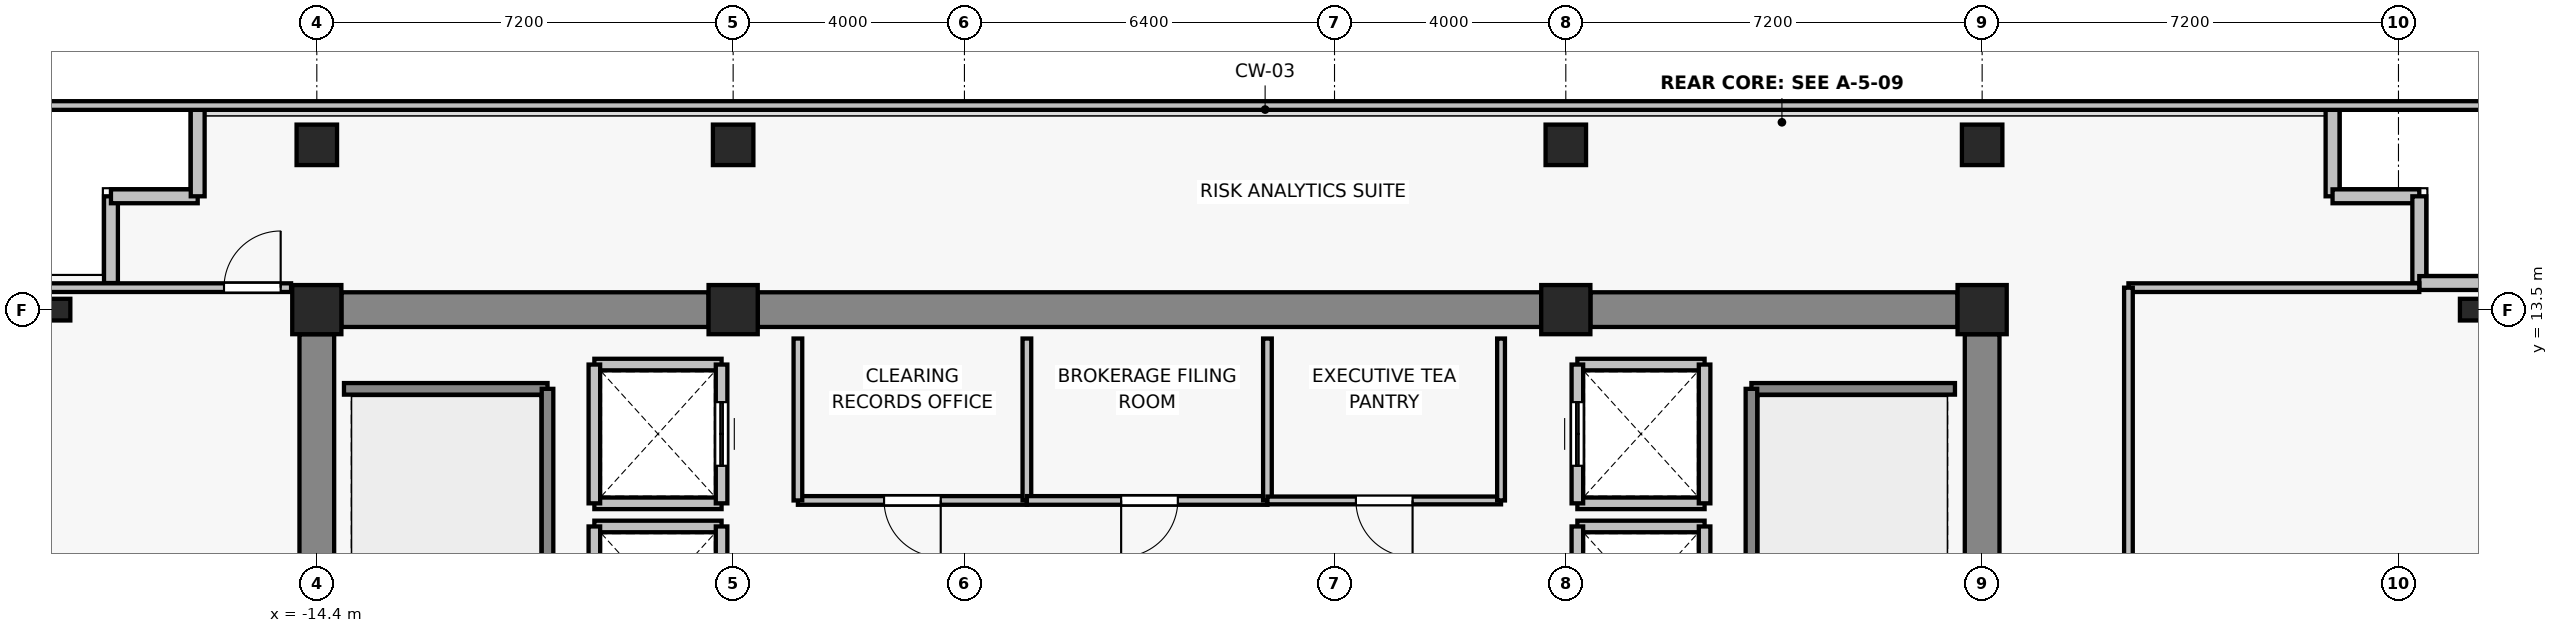
"""IFC4 building model, lengths in metres.
Left out: names, types, materials, properties, quantities, classifications, styles, units other than length and angle.
Written with IfcOpenShell. Run it as: python <this file> out.ifc"""

import sys

from ifc_helpers import new_model, si_unit, direction, frame, frame_2d, origin, origin_2d, place, context, subcontext, project, spatial, rectangle, i_section, extrude, source, transform, mapped, element, fill, save


model = new_model("IFC4")
c1 = context("Model", 3, precision=1e-05, world=origin(), true_north=direction((0.0, 1.0)))
c2 = subcontext(c1, "Body", "Model", "MODEL_VIEW")
j1 = project(units=[si_unit("LENGTHUNIT", "METRE"), si_unit("PLANEANGLEUNIT", "RADIAN")], contexts=[c1])
p1 = place(None, origin())
s1 = spatial("IfcSite", under=j1, at=p1, CompositionType="ELEMENT")
p2 = place(p1, origin())
s2 = spatial("IfcBuilding", under=s1, at=p2, CompositionType="ELEMENT")
p3 = place(p2, frame((0.0, 0.0, 241.9)))
s3 = spatial("IfcBuildingStorey", under=s2, at=p3, CompositionType="ELEMENT", Elevation=241.9)
for number, where, z_axis, x_axis in (
    (1, (-14.4, 13.5, 0.0), (0.0, 0.0, 1.0), (1.0, 0.0, 0.0)),
    (2, (-7.2, 13.5, 0.0), (0.0, 0.0, 1.0), (1.0, 0.0, 0.0)),
    (3, (7.2, 13.5, 0.0), (0.0, 0.0, 1.0), (1.0, 0.0, 0.0)),
    (4, (14.4, 13.5, 0.0), (0.0, 0.0, 1.0), (1.0, 0.0, 0.0)),
):
    element("IfcColumn", number, at=place(p3, frame(where, z_axis=z_axis, x_axis=x_axis)), inside=s3, PredefinedType="COLUMN", context=c2, shape_type="SweptSolid", body=[
        extrude(rectangle(XDim=0.85, YDim=0.85, at=origin_2d()), origin(), (0.0, 0.0, 1.0), 3.3),
    ])
for number, where, z_axis, x_axis in (
    (5, (-14.4, 16.35, 0.0), (0.0, 0.0, 1.0), (1.0, 0.0, 0.0)),
    (6, (-7.2, 16.35, 0.0), (0.0, 0.0, 1.0), (1.0, 0.0, 0.0)),
    (7, (7.2, 16.35, 0.0), (0.0, 0.0, 1.0), (1.0, 0.0, 0.0)),
    (8, (14.4, 16.35, 0.0), (0.0, 0.0, 1.0), (1.0, 0.0, 0.0)),
):
    element("IfcColumn", number, at=place(p3, frame(where, z_axis=z_axis, x_axis=x_axis)), inside=s3, PredefinedType="COLUMN", context=c2, shape_type="SweptSolid", body=[
        extrude(rectangle(XDim=0.7, YDim=0.7, at=origin_2d()), origin(), (0.0, 0.0, 1.0), 3.3),
    ])
for number, where, z_axis, x_axis in (
    (9, (-18.85, 13.5, 0.0), (0.0, 0.0, 1.0), (1.0, 0.0, 0.0)),
    (10, (22.85, 13.5, 0.0), (0.0, 0.0, 1.0), (1.0, 0.0, 0.0)),
):
    element("IfcColumn", number, at=place(p3, frame(where, z_axis=z_axis, x_axis=x_axis)), inside=s3, PredefinedType="COLUMN", context=c2, shape_type="SweptSolid", body=[
        extrude(i_section(OverallWidth=0.375, OverallDepth=0.375, WebThickness=0.017, FlangeThickness=0.027, FilletRadius=0.015, at=origin_2d()), origin(), (0.0, 0.0, 1.0), 3.3),
    ])
p4 = place(p3, frame((-13.975, 13.5, 0.0), z_axis=(0.0, 0.0, 1.0), x_axis=(1.0, 0.0, 0.0)))
e11 = element("IfcWall", 11, at=p4, inside=s3, PredefinedType="SHEAR", context=c2, shape_type="SweptSolid", body=[
    extrude(rectangle(XDim=6.35, YDim=0.6, at=frame_2d((3.175, 0.0))), origin(), (0.0, 0.0, 1.0), 3.075),
])
p5 = place(p3, frame((-6.775, 13.5, 0.0), z_axis=(0.0, 0.0, 1.0), x_axis=(1.0, 0.0, 0.0)))
e12 = element("IfcWall", 12, at=p5, inside=s3, PredefinedType="SHEAR", context=c2, shape_type="SweptSolid", body=[
    extrude(rectangle(XDim=13.55, YDim=0.6, at=frame_2d((6.775, 0.0))), origin(), (0.0, 0.0, 1.0), 3.075),
])
p6 = place(p3, frame((7.625, 13.5, 0.0), z_axis=(0.0, 0.0, 1.0), x_axis=(1.0, 0.0, 0.0)))
e13 = element("IfcWall", 13, at=p6, inside=s3, PredefinedType="SHEAR", context=c2, shape_type="SweptSolid", body=[
    extrude(rectangle(XDim=6.35, YDim=0.6, at=frame_2d((3.175, 0.0))), origin(), (0.0, 0.0, 1.0), 3.075),
])
for number, where, z_axis, x_axis in (
    (14, (-14.4, 7.025, 0.0), (0.0, 0.0, 1.0), (0.0, 1.0, 0.0)),
    (15, (14.4, 7.025, 0.0), (0.0, 0.0, 1.0), (0.0, 1.0, 0.0)),
):
    element("IfcWall", number, at=place(p3, frame(where, z_axis=z_axis, x_axis=x_axis)), inside=s3, PredefinedType="SHEAR", context=c2, shape_type="SweptSolid", body=[
        extrude(rectangle(XDim=6.05, YDim=0.6, at=frame_2d((3.025, 0.0))), origin(), (0.0, 0.0, 1.0), 3.075),
    ])
for number, where, z_axis, x_axis in (
    (16, (-17.96, 15.46, 0.0), (0.0, 0.0, 1.0), (0.0, -1.0, 0.0)),
    (17, (-16.46, 15.46, 0.0), (0.0, 0.0, 1.0), (-1.0, 0.0, 0.0)),
    (18, (-16.46, 16.96, 0.0), (0.0, 0.0, 1.0), (0.0, -1.0, 0.0)),
    (19, (20.46, 15.46, 0.0), (0.0, 0.0, 1.0), (0.0, 1.0, 0.0)),
    (20, (21.96, 15.46, 0.0), (0.0, 0.0, 1.0), (-1.0, 0.0, 0.0)),
    (21, (21.96, 13.96, 0.0), (0.0, 0.0, 1.0), (0.0, 1.0, 0.0)),
    (22, (23.46, 13.96, 0.0), (0.0, 0.0, 1.0), (-1.0, 0.0, 0.0)),
):
    element("IfcWall", number, at=place(p3, frame(where, z_axis=z_axis, x_axis=x_axis)), inside=s3, PredefinedType="SOLIDWALL", context=c2, shape_type="SweptSolid", body=[
        extrude(rectangle(XDim=1.5, YDim=0.24, at=frame_2d((0.75, 0.0))), origin(), (0.0, 0.0, 1.0), 3.075),
    ])
p7 = place(p3, frame((-9.6, 9.75, 0.0), z_axis=(0.0, 0.0, 1.0), x_axis=(1.0, 0.0, 0.0)))
e23 = element("IfcWall", 23, at=p7, inside=s3, PredefinedType="SOLIDWALL", context=c2, shape_type="SweptSolid", body=[
    extrude(rectangle(XDim=2.2, YDim=0.2, at=frame_2d((1.1, 0.0))), origin(), (0.0, 0.0, 1.0), 2.615),
])
p8 = place(p3, frame((-9.6, 7.35, 0.0), z_axis=(0.0, 0.0, 1.0), x_axis=(0.0, 1.0, 0.0)))
e24 = element("IfcWall", 24, at=p8, inside=s3, PredefinedType="SOLIDWALL", context=c2, shape_type="SweptSolid", body=[
    extrude(rectangle(XDim=2.4, YDim=0.2, at=frame_2d((1.2, 0.0))), origin(), (0.0, 0.0, 1.0), 3.075),
])
p9 = place(p3, frame((-7.4, 9.75, 0.0), z_axis=(0.0, 0.0, 1.0), x_axis=(0.0, -1.0, 0.0)))
e25 = element("IfcWall", 25, at=p9, inside=s3, PredefinedType="SOLIDWALL", context=c2, shape_type="SweptSolid", body=[
    extrude(rectangle(XDim=2.4, YDim=0.2, at=frame_2d((1.2, 0.0))), origin(), (0.0, 0.0, 1.0), 2.615),
])
p10 = place(p9, frame((0.65, 0.0, 0.0)))
e26 = element("IfcOpeningElement", 26, at=p10, cuts=e25, PredefinedType="OPENING", context=c2, shape_type="SweptSolid", body=[
    extrude(rectangle(XDim=1.1, YDim=2.2, at=frame_2d((0.55, 1.1))), frame((0.0, 0.11, 0.0), z_axis=(0.0, -1.0, 0.0), x_axis=(1.0, 0.0, 0.0)), (0.0, 0.0, 1.0), 0.22),
])
for number, where, z_axis, x_axis in (
    (27, (-7.4, 10.15, 0.0), (0.0, 0.0, 1.0), (-1.0, 0.0, 0.0)),
    (28, (-9.6, 12.55, 0.0), (0.0, 0.0, 1.0), (1.0, 0.0, 0.0)),
):
    element("IfcWall", number, at=place(p3, frame(where, z_axis=z_axis, x_axis=x_axis)), inside=s3, PredefinedType="SOLIDWALL", context=c2, shape_type="SweptSolid", body=[
        extrude(rectangle(XDim=2.2, YDim=0.2, at=frame_2d((1.1, 0.0))), origin(), (0.0, 0.0, 1.0), 2.615),
    ])
p11 = place(p3, frame((-9.6, 10.15, 0.0), z_axis=(0.0, 0.0, 1.0), x_axis=(0.0, 1.0, 0.0)))
e29 = element("IfcWall", 29, at=p11, inside=s3, PredefinedType="SOLIDWALL", context=c2, shape_type="SweptSolid", body=[
    extrude(rectangle(XDim=2.4, YDim=0.2, at=frame_2d((1.2, 0.0))), origin(), (0.0, 0.0, 1.0), 3.075),
])
p12 = place(p3, frame((-7.4, 12.55, 0.0), z_axis=(0.0, 0.0, 1.0), x_axis=(0.0, -1.0, 0.0)))
e30 = element("IfcWall", 30, at=p12, inside=s3, PredefinedType="SOLIDWALL", context=c2, shape_type="SweptSolid", body=[
    extrude(rectangle(XDim=2.4, YDim=0.2, at=frame_2d((1.2, 0.0))), origin(), (0.0, 0.0, 1.0), 2.615),
])
p13 = place(p12, frame((0.65, 0.0, 0.0)))
e31 = element("IfcOpeningElement", 31, at=p13, cuts=e30, PredefinedType="OPENING", context=c2, shape_type="SweptSolid", body=[
    extrude(rectangle(XDim=1.1, YDim=2.2, at=frame_2d((0.55, 1.1))), frame((0.0, 0.11, 0.0), z_axis=(0.0, -1.0, 0.0), x_axis=(1.0, 0.0, 0.0)), (0.0, 0.0, 1.0), 0.22),
])
p14 = place(p3, frame((7.4, 9.75, 0.0), z_axis=(0.0, 0.0, 1.0), x_axis=(1.0, 0.0, 0.0)))
e32 = element("IfcWall", 32, at=p14, inside=s3, PredefinedType="SOLIDWALL", context=c2, shape_type="SweptSolid", body=[
    extrude(rectangle(XDim=2.2, YDim=0.2, at=frame_2d((1.1, 0.0))), origin(), (0.0, 0.0, 1.0), 2.615),
])
p15 = place(p3, frame((7.4, 7.35, 0.0), z_axis=(0.0, 0.0, 1.0), x_axis=(0.0, 1.0, 0.0)))
e33 = element("IfcWall", 33, at=p15, inside=s3, PredefinedType="SOLIDWALL", context=c2, shape_type="SweptSolid", body=[
    extrude(rectangle(XDim=2.4, YDim=0.2, at=frame_2d((1.2, 0.0))), origin(), (0.0, 0.0, 1.0), 2.615),
])
p16 = place(p15, frame((0.65, 0.0, 0.0)))
e34 = element("IfcOpeningElement", 34, at=p16, cuts=e33, PredefinedType="OPENING", context=c2, shape_type="SweptSolid", body=[
    extrude(rectangle(XDim=1.1, YDim=2.2, at=frame_2d((0.55, 1.1))), frame((0.0, 0.11, 0.0), z_axis=(0.0, -1.0, 0.0), x_axis=(1.0, 0.0, 0.0)), (0.0, 0.0, 1.0), 0.22),
])
p17 = place(p3, frame((9.6, 9.75, 0.0), z_axis=(0.0, 0.0, 1.0), x_axis=(0.0, -1.0, 0.0)))
e35 = element("IfcWall", 35, at=p17, inside=s3, PredefinedType="SOLIDWALL", context=c2, shape_type="SweptSolid", body=[
    extrude(rectangle(XDim=2.4, YDim=0.2, at=frame_2d((1.2, 0.0))), origin(), (0.0, 0.0, 1.0), 3.075),
])
for number, where, z_axis, x_axis in (
    (36, (9.6, 10.15, 0.0), (0.0, 0.0, 1.0), (-1.0, 0.0, 0.0)),
    (37, (7.4, 12.55, 0.0), (0.0, 0.0, 1.0), (1.0, 0.0, 0.0)),
):
    element("IfcWall", number, at=place(p3, frame(where, z_axis=z_axis, x_axis=x_axis)), inside=s3, PredefinedType="SOLIDWALL", context=c2, shape_type="SweptSolid", body=[
        extrude(rectangle(XDim=2.2, YDim=0.2, at=frame_2d((1.1, 0.0))), origin(), (0.0, 0.0, 1.0), 2.615),
    ])
p18 = place(p3, frame((7.4, 10.15, 0.0), z_axis=(0.0, 0.0, 1.0), x_axis=(0.0, 1.0, 0.0)))
e38 = element("IfcWall", 38, at=p18, inside=s3, PredefinedType="SOLIDWALL", context=c2, shape_type="SweptSolid", body=[
    extrude(rectangle(XDim=2.4, YDim=0.2, at=frame_2d((1.2, 0.0))), origin(), (0.0, 0.0, 1.0), 2.615),
])
p19 = place(p18, frame((0.65, 0.0, 0.0)))
e39 = element("IfcOpeningElement", 39, at=p19, cuts=e38, PredefinedType="OPENING", context=c2, shape_type="SweptSolid", body=[
    extrude(rectangle(XDim=1.1, YDim=2.2, at=frame_2d((0.55, 1.1))), frame((0.0, 0.11, 0.0), z_axis=(0.0, -1.0, 0.0), x_axis=(1.0, 0.0, 0.0)), (0.0, 0.0, 1.0), 0.22),
])
p20 = place(p3, frame((9.6, 12.55, 0.0), z_axis=(0.0, 0.0, 1.0), x_axis=(0.0, -1.0, 0.0)))
e40 = element("IfcWall", 40, at=p20, inside=s3, PredefinedType="SOLIDWALL", context=c2, shape_type="SweptSolid", body=[
    extrude(rectangle(XDim=2.4, YDim=0.2, at=frame_2d((1.2, 0.0))), origin(), (0.0, 0.0, 1.0), 3.075),
])
p21 = place(p3, frame((-13.93, 12.13, 0.0), z_axis=(0.0, 0.0, 1.0), x_axis=(1.0, 0.0, 0.0)))
e41 = element("IfcWall", 41, at=p21, inside=s3, PredefinedType="SOLIDWALL", context=c2, shape_type="SweptSolid", body=[
    extrude(rectangle(XDim=3.52, YDim=0.2, at=frame_2d((1.76, 0.0))), origin(), (0.0, 0.0, 1.0), 3.075),
])
p22 = place(p3, frame((-10.41, 12.13, 0.0), z_axis=(0.0, 0.0, 1.0), x_axis=(0.0, -1.0, 0.0)))
e42 = element("IfcWall", 42, at=p22, inside=s3, PredefinedType="SOLIDWALL", context=c2, shape_type="SweptSolid", body=[
    extrude(rectangle(XDim=8.84, YDim=0.2, at=frame_2d((4.42, 0.0))), origin(), (0.0, 0.0, 1.0), 3.075),
])
p23 = place(p3, frame((10.41, 12.13, 0.0), z_axis=(0.0, 0.0, 1.0), x_axis=(1.0, 0.0, 0.0)))
e43 = element("IfcWall", 43, at=p23, inside=s3, PredefinedType="SOLIDWALL", context=c2, shape_type="SweptSolid", body=[
    extrude(rectangle(XDim=3.52, YDim=0.2, at=frame_2d((1.76, 0.0))), origin(), (0.0, 0.0, 1.0), 3.075),
])
p24 = place(p3, frame((10.41, 3.29, 0.0), z_axis=(0.0, 0.0, 1.0), x_axis=(0.0, 1.0, 0.0)))
e44 = element("IfcWall", 44, at=p24, inside=s3, PredefinedType="SOLIDWALL", context=c2, shape_type="SweptSolid", body=[
    extrude(rectangle(XDim=8.84, YDim=0.2, at=frame_2d((4.42, 0.0))), origin(), (0.0, 0.0, 1.0), 3.075),
])
p25 = place(p3, frame((-2.12, 10.2, 0.0), z_axis=(0.0, 0.0, 1.0), x_axis=(-1.0, 0.0, 0.0)))
e45 = element("IfcWall", 45, at=p25, inside=s3, PredefinedType="PARTITIONING", context=c2, shape_type="SweptSolid", body=[
    extrude(rectangle(XDim=3.96, YDim=0.15, at=frame_2d((1.98, 0.0))), origin(), (0.0, 0.0, 1.0), 3.075),
])
p26 = place(p25, frame((1.49, 0.0, 0.0)))
e46 = element("IfcOpeningElement", 46, at=p26, cuts=e45, PredefinedType="OPENING", context=c2, shape_type="SweptSolid", body=[
    extrude(rectangle(XDim=0.98, YDim=2.15, at=frame_2d((0.49, 1.075))), frame((0.0, 0.085, 0.0), z_axis=(0.0, -1.0, 0.0), x_axis=(1.0, 0.0, 0.0)), (0.0, 0.0, 1.0), 0.17),
])
for number, where, z_axis, x_axis in (
    (47, (-6.08, 10.2, 0.0), (0.0, 0.0, 1.0), (0.0, 1.0, 0.0)),
    (48, (-2.12, 13.0, 0.0), (0.0, 0.0, 1.0), (0.0, -1.0, 0.0)),
):
    element("IfcWall", number, at=place(p3, frame(where, z_axis=z_axis, x_axis=x_axis)), inside=s3, PredefinedType="PARTITIONING", context=c2, shape_type="SweptSolid", body=[
        extrude(rectangle(XDim=2.8, YDim=0.15, at=frame_2d((1.4, 0.0))), origin(), (0.0, 0.0, 1.0), 3.075),
    ])
p27 = place(p3, frame((2.04, 10.2, 0.0), z_axis=(0.0, 0.0, 1.0), x_axis=(-1.0, 0.0, 0.0)))
e49 = element("IfcWall", 49, at=p27, inside=s3, PredefinedType="PARTITIONING", context=c2, shape_type="SweptSolid", body=[
    extrude(rectangle(XDim=4.16, YDim=0.15, at=frame_2d((2.08, 0.0))), origin(), (0.0, 0.0, 1.0), 3.075),
])
p28 = place(p27, frame((1.55, 0.0, 0.0)))
e50 = element("IfcOpeningElement", 50, at=p28, cuts=e49, PredefinedType="OPENING", context=c2, shape_type="SweptSolid", body=[
    extrude(rectangle(XDim=0.98, YDim=2.15, at=frame_2d((0.49, 1.075))), frame((0.0, 0.085, 0.0), z_axis=(0.0, -1.0, 0.0), x_axis=(1.0, 0.0, 0.0)), (0.0, 0.0, 1.0), 0.17),
])
p29 = place(p3, frame((2.04, 13.0, 0.0), z_axis=(0.0, 0.0, 1.0), x_axis=(0.0, -1.0, 0.0)))
e51 = element("IfcWall", 51, at=p29, inside=s3, PredefinedType="PARTITIONING", context=c2, shape_type="SweptSolid", body=[
    extrude(rectangle(XDim=2.8, YDim=0.15, at=frame_2d((1.4, 0.0))), origin(), (0.0, 0.0, 1.0), 3.075),
])
p30 = place(p3, frame((6.08, 10.2, 0.0), z_axis=(0.0, 0.0, 1.0), x_axis=(-1.0, 0.0, 0.0)))
e52 = element("IfcWall", 52, at=p30, inside=s3, PredefinedType="PARTITIONING", context=c2, shape_type="SweptSolid", body=[
    extrude(rectangle(XDim=4.04, YDim=0.135, at=frame_2d((2.02, 0.0))), origin(), (0.0, 0.0, 1.0), 3.075),
])
p31 = place(p30, frame((1.53, 0.0, 0.0)))
e53 = element("IfcOpeningElement", 53, at=p31, cuts=e52, PredefinedType="OPENING", context=c2, shape_type="SweptSolid", body=[
    extrude(rectangle(XDim=0.98, YDim=2.15, at=frame_2d((0.49, 1.075))), frame((0.0, 0.077, 0.0), z_axis=(0.0, -1.0, 0.0), x_axis=(1.0, 0.0, 0.0)), (0.0, 0.0, 1.0), 0.155),
])
p32 = place(p3, frame((6.08, 13.0, 0.0), z_axis=(0.0, 0.0, 1.0), x_axis=(0.0, -1.0, 0.0)))
e54 = element("IfcWall", 54, at=p32, inside=s3, PredefinedType="PARTITIONING", context=c2, shape_type="SweptSolid", body=[
    extrude(rectangle(XDim=2.8, YDim=0.135, at=frame_2d((1.4, 0.0))), origin(), (0.0, 0.0, 1.0), 3.075),
])
p33 = place(p3, frame((-19.53, 13.88, 0.0), z_axis=(0.0, 0.0, 1.0), x_axis=(1.0, 0.0, 0.0)))
e55 = element("IfcWall", 55, at=p33, inside=s3, PredefinedType="PARTITIONING", context=c2, shape_type="SweptSolid", body=[
    extrude(rectangle(XDim=4.685, YDim=0.15, at=frame_2d((2.343, 0.0))), origin(), (0.0, 0.0, 1.0), 3.075),
])
p34 = place(p33, frame((3.525, 0.0, 0.0)))
e56 = element("IfcOpeningElement", 56, at=p34, cuts=e55, PredefinedType="OPENING", context=c2, shape_type="SweptSolid", body=[
    extrude(rectangle(XDim=0.98, YDim=2.15, at=frame_2d((0.49, 1.075))), frame((0.0, 0.085, 0.0), z_axis=(0.0, -1.0, 0.0), x_axis=(1.0, 0.0, 0.0)), (0.0, 0.0, 1.0), 0.17),
])
p35 = place(p3, frame((16.93, 13.88, 0.0), z_axis=(0.0, 0.0, 1.0), x_axis=(1.0, 0.0, 0.0)))
e57 = element("IfcWall", 57, at=p35, inside=s3, PredefinedType="PARTITIONING", context=c2, shape_type="SweptSolid", body=[
    extrude(rectangle(XDim=5.03, YDim=0.15, at=frame_2d((2.515, 0.0))), origin(), (0.0, 0.0, 1.0), 3.075),
])
p36 = place(p3, frame((16.93, -1.77, 0.0), z_axis=(0.0, 0.0, 1.0), x_axis=(0.0, 1.0, 0.0)))
e58 = element("IfcWall", 58, at=p36, inside=s3, PredefinedType="PARTITIONING", context=c2, shape_type="SweptSolid", body=[
    extrude(rectangle(XDim=15.65, YDim=0.15, at=frame_2d((7.825, 0.0))), origin(), (0.0, 0.0, 1.0), 2.615),
])
p37 = place(p36, frame((7.335, 0.0, 0.0)))
e59 = element("IfcOpeningElement", 59, at=p37, cuts=e58, PredefinedType="OPENING", context=c2, shape_type="SweptSolid", body=[
    extrude(rectangle(XDim=0.98, YDim=2.15, at=frame_2d((0.49, 1.075))), frame((0.0, 0.085, 0.0), z_axis=(0.0, -1.0, 0.0), x_axis=(1.0, 0.0, 0.0)), (0.0, 0.0, 1.0), 0.17),
])
p38 = place(p3, frame((-19.53, 17.03, 0.0), z_axis=(0.0, 0.0, 1.0), x_axis=(1.0, 0.0, 0.0)))
e60 = element("IfcWall", 60, at=p38, inside=s3, PredefinedType="PARTITIONING", context=c2, shape_type="SweptSolid", body=[
    extrude(rectangle(XDim=43.06, YDim=0.15, at=frame_2d((21.53, 0.0))), origin(), (0.0, 0.0, 1.0), 3.075),
])
m1 = source(origin(), c2, "Body", "SweptSolid", [
    extrude(rectangle(XDim=1.1, YDim=2.2, at=frame_2d((0.55, 1.1))), frame((0.0, 0.025, 0.0), z_axis=(0.0, -1.0, 0.0), x_axis=(1.0, 0.0, 0.0)), (0.0, 0.0, 1.0), 0.05),
])
p39 = place(p13, origin())
e61 = element("IfcDoor", 61, at=p39, inside=s3, OperationType="DOUBLE_DOOR_SLIDING", PredefinedType="DOOR", context=c2, shape_type="MappedRepresentation", body=[
    mapped(m1, transform((0.0, 0.0, 0.0), x_axis=(1.0, 0.0, 0.0), y_axis=(0.0, 1.0, 0.0), z_axis=(0.0, 0.0, 1.0), scale=1.0)),
])
fill(e31, e61)
p40 = place(p19, origin())
e62 = element("IfcDoor", 62, at=p40, inside=s3, OperationType="DOUBLE_DOOR_SLIDING", PredefinedType="DOOR", context=c2, shape_type="MappedRepresentation", body=[
    mapped(m1, transform((0.0, 0.0, 0.0), x_axis=(1.0, 0.0, 0.0), y_axis=(0.0, 1.0, 0.0), z_axis=(0.0, 0.0, 1.0), scale=1.0)),
])
fill(e39, e62)
m2 = source(origin(), c2, "Body", "SweptSolid", [
    extrude(rectangle(XDim=0.98, YDim=2.15, at=frame_2d((0.49, 1.075))), frame((0.0, 0.025, 0.0), z_axis=(0.0, -1.0, 0.0), x_axis=(1.0, 0.0, 0.0)), (0.0, 0.0, 1.0), 0.05),
])
p41 = place(p26, origin())
e63 = element("IfcDoor", 63, at=p41, inside=s3, OperationType="SINGLE_SWING_LEFT", PredefinedType="DOOR", context=c2, shape_type="MappedRepresentation", body=[
    mapped(m2, transform((0.0, 0.0, 0.0), x_axis=(1.0, 0.0, 0.0), y_axis=(0.0, 1.0, 0.0), z_axis=(0.0, 0.0, 1.0), scale=1.0)),
])
fill(e46, e63)
p42 = place(p28, origin())
e64 = element("IfcDoor", 64, at=p42, inside=s3, OperationType="SINGLE_SWING_RIGHT", PredefinedType="DOOR", context=c2, shape_type="MappedRepresentation", body=[
    mapped(m2, transform((0.0, 0.0, 0.0), x_axis=(1.0, 0.0, 0.0), y_axis=(0.0, 1.0, 0.0), z_axis=(0.0, 0.0, 1.0), scale=1.0)),
])
fill(e50, e64)
p43 = place(p31, origin())
e65 = element("IfcDoor", 65, at=p43, inside=s3, OperationType="SINGLE_SWING_LEFT", PredefinedType="DOOR", context=c2, shape_type="MappedRepresentation", body=[
    mapped(m2, transform((0.0, 0.0, 0.0), x_axis=(1.0, 0.0, 0.0), y_axis=(0.0, 1.0, 0.0), z_axis=(0.0, 0.0, 1.0), scale=1.0)),
])
fill(e53, e65)
p44 = place(p34, origin())
e66 = element("IfcDoor", 66, at=p44, inside=s3, OperationType="SINGLE_SWING_RIGHT", PredefinedType="DOOR", context=c2, shape_type="MappedRepresentation", body=[
    mapped(m2, transform((0.0, 0.0, 0.0), x_axis=(1.0, 0.0, 0.0), y_axis=(0.0, 1.0, 0.0), z_axis=(0.0, 0.0, 1.0), scale=1.0)),
])
fill(e56, e66)
save(model, sys.argv[1])
